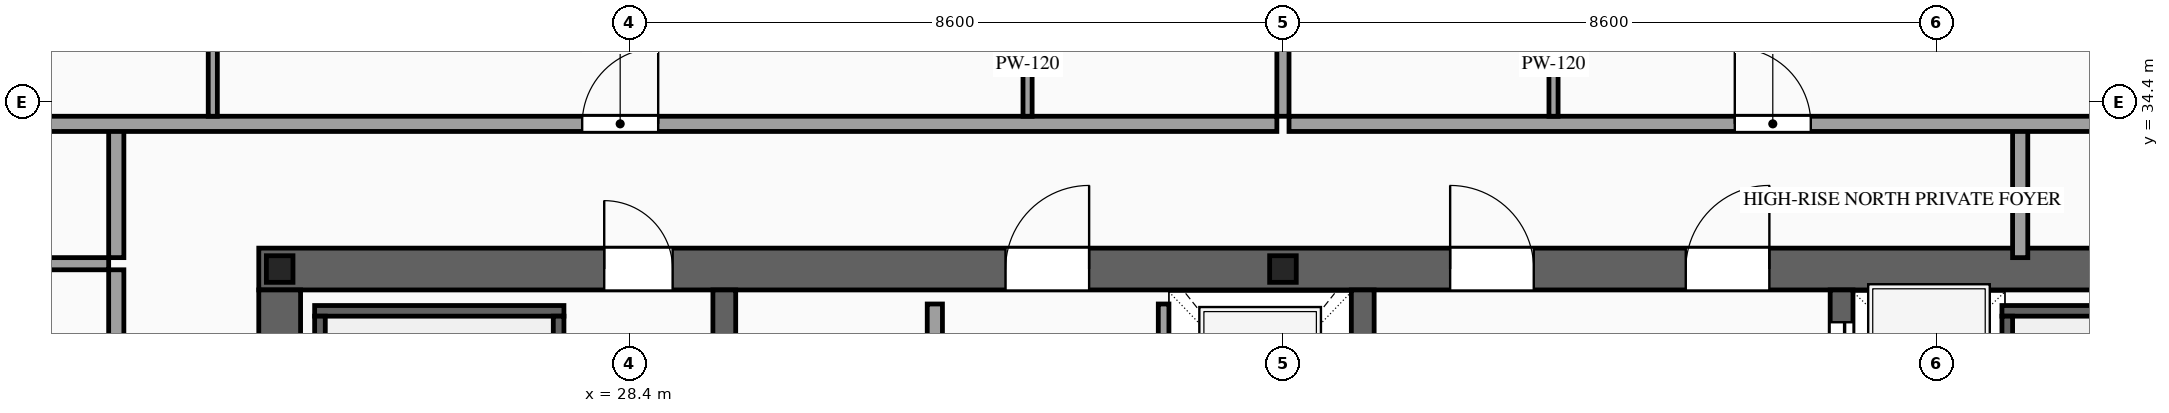
"""IFC4 building model, lengths in metres.
Left out: names, types, materials, properties, quantities, classifications, styles, units other than length and angle.
Written with IfcOpenShell. Run it as: python <this file> out.ifc"""

import sys

from ifc_helpers import new_model, si_unit, direction, frame, frame_2d, origin, origin_2d, place, context, subcontext, project, spatial, rectangle, i_section, extrude, source, transform, mapped, element, fill, save


model = new_model("IFC4")
c1 = context("Model", 3, precision=1e-05, world=origin(), true_north=direction((0.0, 1.0)))
c2 = subcontext(c1, "Body", "Model", "MODEL_VIEW")
j1 = project(units=[si_unit("LENGTHUNIT", "METRE"), si_unit("PLANEANGLEUNIT", "RADIAN")], contexts=[c1])
p1 = place(None, origin())
s1 = spatial("IfcSite", under=j1, at=p1, CompositionType="ELEMENT")
p2 = place(p1, origin())
s2 = spatial("IfcBuilding", under=s1, at=p2, CompositionType="ELEMENT")
p3 = place(p2, frame((0.0, 0.0, 275.1)))
s3 = spatial("IfcBuildingStorey", under=s2, at=p3, CompositionType="ELEMENT", Elevation=275.1)
p4 = place(p3, frame((23.525, 32.2, 0.0), z_axis=(0.0, 0.0, 1.0), x_axis=(1.0, 0.0, 0.0)))
e1 = element("IfcWall", 1, at=p4, inside=s3, PredefinedType="SHEAR", context=c2, shape_type="SweptSolid", body=[
    extrude(rectangle(XDim=26.95, YDim=0.55, at=frame_2d((13.475, 0.0))), origin(), (0.0, 0.0, 1.0), 3.5),
])
p5 = place(p4, frame((4.545, 0.0, 0.0)))
e2 = element("IfcOpeningElement", 2, at=p5, cuts=e1, PredefinedType="OPENING", context=c2, shape_type="SweptSolid", body=[
    extrude(rectangle(XDim=0.9, YDim=2.15, at=frame_2d((0.45, 1.075))), frame((0.0, 0.29, 0.0), z_axis=(0.0, -1.0, 0.0), x_axis=(1.0, 0.0, 0.0)), (0.0, 0.0, 1.0), 0.58),
])
p6 = place(p4, frame((9.825, 0.0, 0.0)))
e3 = element("IfcOpeningElement", 3, at=p6, cuts=e1, PredefinedType="OPENING", context=c2, shape_type="SweptSolid", body=[
    extrude(rectangle(XDim=1.1, YDim=2.2, at=frame_2d((0.55, 1.1))), frame((0.0, 0.29, 0.0), z_axis=(0.0, -1.0, 0.0), x_axis=(1.0, 0.0, 0.0)), (0.0, 0.0, 1.0), 0.58),
])
p7 = place(p4, frame((15.675, 0.0, 0.0)))
e4 = element("IfcOpeningElement", 4, at=p7, cuts=e1, PredefinedType="OPENING", context=c2, shape_type="SweptSolid", body=[
    extrude(rectangle(XDim=1.1, YDim=2.2, at=frame_2d((0.55, 1.1))), frame((0.0, 0.29, 0.0), z_axis=(0.0, -1.0, 0.0), x_axis=(1.0, 0.0, 0.0)), (0.0, 0.0, 1.0), 0.58),
])
p8 = place(p4, frame((18.775, 0.0, 0.0)))
e5 = element("IfcOpeningElement", 5, at=p8, cuts=e1, PredefinedType="OPENING", context=c2, shape_type="SweptSolid", body=[
    extrude(rectangle(XDim=1.1, YDim=2.2, at=frame_2d((0.55, 1.1))), frame((0.0, 0.29, 0.0), z_axis=(0.0, -1.0, 0.0), x_axis=(1.0, 0.0, 0.0)), (0.0, 0.0, 1.0), 0.58),
])
m1 = source(origin(), c2, "Body", "SweptSolid", [
    extrude(rectangle(XDim=12.25, YDim=0.55, at=frame_2d((6.125, 0.0))), origin(), (0.0, 0.0, 1.0), 3.5),
])
p9 = place(p3, frame((23.8, 19.675, 0.0), z_axis=(0.0, 0.0, 1.0), x_axis=(0.0, 1.0, 0.0)))
e6 = element("IfcWall", 6, at=p9, inside=s3, PredefinedType="SHEAR", context=c2, shape_type="MappedRepresentation", body=[
    mapped(m1, transform((0.0, 0.0, 0.0), scale=1.0)),
])
m2 = source(origin(), c2, "Body", "SweptSolid", [
    extrude(rectangle(XDim=12.25, YDim=0.3, at=frame_2d((6.125, 0.0))), origin(), (0.0, 0.0, 1.0), 3.5),
])
for number, where, z_axis, x_axis in (
    (7, (29.65, 19.675, 0.0), (0.0, 0.0, 1.0), (0.0, 1.0, 0.0)),
    (8, (38.05, 19.675, 0.0), (0.0, 0.0, 1.0), (0.0, 1.0, 0.0)),
):
    element("IfcWall", number, at=place(p3, frame(where, z_axis=z_axis, x_axis=x_axis)), inside=s3, PredefinedType="SOLIDWALL", context=c2, shape_type="MappedRepresentation", body=[
        mapped(m2, transform((0.0, 0.0, 0.0), scale=1.0)),
    ])
p10 = place(p3, frame((44.35, 19.675, 0.0), z_axis=(0.0, 0.0, 1.0), x_axis=(0.0, 1.0, 0.0)))
e9 = element("IfcWall", 9, at=p10, inside=s3, PredefinedType="SOLIDWALL", context=c2, shape_type="SweptSolid", body=[
    extrude(rectangle(XDim=12.25, YDim=0.3, at=frame_2d((6.125, 0.0))), origin(), (0.0, 0.0, 1.0), 3.5),
])
p11 = place(p10, frame((6.525, 0.0, 0.0)))
e10 = element("IfcOpeningElement", 10, at=p11, cuts=e9, PredefinedType="OPENING", context=c2, shape_type="SweptSolid", body=[
    extrude(rectangle(XDim=1.1, YDim=2.2, at=frame_2d((0.55, 1.1))), frame((0.0, 0.165, 0.0), z_axis=(0.0, -1.0, 0.0), x_axis=(1.0, 0.0, 0.0)), (0.0, 0.0, 1.0), 0.33),
])
p12 = place(p10, frame((8.625, 0.0, 0.0)))
e11 = element("IfcOpeningElement", 11, at=p12, cuts=e9, PredefinedType="OPENING", context=c2, shape_type="SweptSolid", body=[
    extrude(rectangle(XDim=1.1, YDim=2.2, at=frame_2d((0.55, 1.1))), frame((0.0, 0.165, 0.0), z_axis=(0.0, -1.0, 0.0), x_axis=(1.0, 0.0, 0.0)), (0.0, 0.0, 1.0), 0.33),
])
p13 = place(p10, frame((10.725, 0.0, 0.0)))
e12 = element("IfcOpeningElement", 12, at=p13, cuts=e9, PredefinedType="OPENING", context=c2, shape_type="SweptSolid", body=[
    extrude(rectangle(XDim=1.1, YDim=2.2, at=frame_2d((0.55, 1.1))), frame((0.0, 0.165, 0.0), z_axis=(0.0, -1.0, 0.0), x_axis=(1.0, 0.0, 0.0)), (0.0, 0.0, 1.0), 0.33),
])
m3 = source(origin(), c2, "Body", "SweptSolid", [
    extrude(i_section(OverallWidth=0.35, OverallDepth=0.35, WebThickness=0.012, FlangeThickness=0.019, at=origin_2d()), origin(), (0.0, 0.0, 1.0), 3.5),
])
for number, where, z_axis, x_axis in (
    (13, (23.8, 32.2, 0.0), (0.0, 0.0, 1.0), (1.0, 0.0, 0.0)),
    (14, (37.0, 32.2, 0.0), (0.0, 0.0, 1.0), (1.0, 0.0, 0.0)),
):
    element("IfcColumn", number, at=place(p3, frame(where, z_axis=z_axis, x_axis=x_axis)), inside=s3, PredefinedType="COLUMN", context=c2, shape_type="MappedRepresentation", body=[
        mapped(m3, transform((0.0, 0.0, 0.0), scale=1.0)),
    ])
p14 = place(p3, frame((35.43, 29.4, 0.0), z_axis=(0.0, 0.0, 1.0), x_axis=(0.0, 1.0, 0.0)))
e15 = element("IfcWall", 15, at=p14, inside=s3, PredefinedType="SOLIDWALL", context=c2, shape_type="SweptSolid", body=[
    extrude(rectangle(XDim=2.34, YDim=0.14, at=frame_2d((1.17, 0.0))), origin(), (0.0, 0.0, 1.0), 3.28),
])
p15 = place(p14, frame((0.62, 0.0, 0.0)))
e16 = element("IfcOpeningElement", 16, at=p15, cuts=e15, PredefinedType="OPENING", context=c2, shape_type="SweptSolid", body=[
    extrude(rectangle(XDim=1.1, YDim=2.2, at=frame_2d((0.55, 1.1))), frame((0.0, 0.085, 0.0), z_axis=(0.0, -1.0, 0.0), x_axis=(1.0, 0.0, 0.0)), (0.0, 0.0, 1.0), 0.17),
])
m4 = source(origin(), c2, "Body", "SweptSolid", [
    extrude(rectangle(XDim=3.28, YDim=0.14, at=frame_2d((1.64, 0.0))), origin(), (0.0, 0.0, 1.0), 3.28),
])
p16 = place(p3, frame((24.26, 31.65, 0.0), z_axis=(0.0, 0.0, 1.0), x_axis=(1.0, 0.0, 0.0)))
e17 = element("IfcWall", 17, at=p16, inside=s3, PredefinedType="SOLIDWALL", context=c2, shape_type="MappedRepresentation", body=[
    mapped(m4, transform((0.0, 0.0, 0.0), scale=1.0)),
])
m5 = source(origin(), c2, "Body", "SweptSolid", [
    extrude(rectangle(XDim=8.94, YDim=0.14, at=frame_2d((4.47, 0.0))), origin(), (0.0, 0.0, 1.0), 3.28),
])
for number, where, z_axis, x_axis in (
    (18, (24.33, 22.64, 0.0), (0.0, 0.0, 1.0), (0.0, 1.0, 0.0)),
    (19, (27.47, 22.64, 0.0), (0.0, 0.0, 1.0), (0.0, 1.0, 0.0)),
):
    element("IfcWall", number, at=place(p3, frame(where, z_axis=z_axis, x_axis=x_axis)), inside=s3, PredefinedType="SOLIDWALL", context=c2, shape_type="MappedRepresentation", body=[
        mapped(m5, transform((0.0, 0.0, 0.0), scale=1.0)),
    ])
p17 = place(p3, frame((46.46, 31.65, 0.0), z_axis=(0.0, 0.0, 1.0), x_axis=(1.0, 0.0, 0.0)))
e20 = element("IfcWall", 20, at=p17, inside=s3, PredefinedType="SOLIDWALL", context=c2, shape_type="MappedRepresentation", body=[
    mapped(m4, transform((0.0, 0.0, 0.0), scale=1.0)),
])
p18 = place(p3, frame((46.53, 22.64, 0.0), z_axis=(0.0, 0.0, 1.0), x_axis=(0.0, 1.0, 0.0)))
e21 = element("IfcWall", 21, at=p18, inside=s3, PredefinedType="SOLIDWALL", context=c2, shape_type="MappedRepresentation", body=[
    mapped(m5, transform((0.0, 0.0, 0.0), scale=1.0)),
])
p19 = place(p3, frame((32.42, 28.05, 0.0), z_axis=(0.0, 0.0, 1.0), x_axis=(0.0, 1.0, 0.0)))
e22 = element("IfcWall", 22, at=p19, inside=s3, PredefinedType="PARTITIONING", context=c2, shape_type="SweptSolid", body=[
    extrude(rectangle(XDim=3.69, YDim=0.2, at=frame_2d((1.845, 0.0))), origin(), (0.0, 0.0, 1.0), 3.28),
])
p20 = place(p19, frame((1.395, 0.0, 0.0)))
e23 = element("IfcOpeningElement", 23, at=p20, cuts=e22, PredefinedType="OPENING", context=c2, shape_type="SweptSolid", body=[
    extrude(rectangle(XDim=0.9, YDim=2.15, at=frame_2d((0.45, 1.075))), frame((0.0, 0.115, 0.0), z_axis=(0.0, -1.0, 0.0), x_axis=(1.0, 0.0, 0.0)), (0.0, 0.0, 1.0), 0.23),
])
m6 = source(origin(), c2, "Body", "SweptSolid", [
    extrude(rectangle(XDim=1.7, YDim=0.2, at=frame_2d((0.85, 0.0))), origin(), (0.0, 0.0, 1.0), 3.28),
])
for number, where, z_axis, x_axis in (
    (24, (21.65, 32.35, 0.0), (0.0, 0.0, 1.0), (0.0, 1.0, 0.0)),
    (25, (46.7, 32.35, 0.0), (0.0, 0.0, 1.0), (0.0, 1.0, 0.0)),
):
    element("IfcWall", number, at=place(p3, frame(where, z_axis=z_axis, x_axis=x_axis)), inside=s3, PredefinedType="PARTITIONING", context=c2, shape_type="MappedRepresentation", body=[
        mapped(m6, transform((0.0, 0.0, 0.0), scale=1.0)),
    ])
p21 = place(p3, frame((19.44, 34.11, 0.0), z_axis=(0.0, 0.0, 1.0), x_axis=(1.0, 0.0, 0.0)))
e26 = element("IfcWall", 26, at=p21, inside=s3, PredefinedType="PARTITIONING", context=c2, shape_type="SweptSolid", body=[
    extrude(rectangle(XDim=17.48, YDim=0.2, at=frame_2d((8.74, 0.0))), origin(), (0.0, 0.0, 1.0), 3.28),
])
p22 = place(p21, frame((8.34, 0.0, 0.0)))
e27 = element("IfcOpeningElement", 27, at=p22, cuts=e26, PredefinedType="OPENING", context=c2, shape_type="SweptSolid", body=[
    extrude(rectangle(XDim=1.0, YDim=2.2, at=frame_2d((0.5, 1.1))), frame((0.0, 0.115, 0.0), z_axis=(0.0, -1.0, 0.0), x_axis=(1.0, 0.0, 0.0)), (0.0, 0.0, 1.0), 0.23),
])
m7 = source(origin(), c2, "Body", "SweptSolid", [
    extrude(rectangle(XDim=12.04, YDim=0.16, at=frame_2d((6.02, 0.0))), origin(), (0.0, 0.0, 1.0), 2.787),
])
p23 = place(p3, frame((37.0, 34.21, 0.0), z_axis=(0.0, 0.0, 1.0), x_axis=(0.0, 1.0, 0.0)))
e28 = element("IfcWall", 28, at=p23, inside=s3, PredefinedType="PARTITIONING", context=c2, shape_type="MappedRepresentation", body=[
    mapped(m7, transform((0.0, 0.0, 0.0), scale=1.0)),
])
p24 = place(p3, frame((22.92, 34.21, 0.0), z_axis=(0.0, 0.0, 1.0), x_axis=(0.0, 1.0, 0.0)))
e29 = element("IfcWall", 29, at=p24, inside=s3, PredefinedType="PARTITIONING", context=c2, shape_type="SweptSolid", body=[
    extrude(rectangle(XDim=4.11, YDim=0.12, at=frame_2d((2.055, 0.0))), origin(), (0.0, 0.0, 1.0), 3.28),
])
p25 = place(p24, frame((1.63, 0.0, 0.0)))
e30 = element("IfcOpeningElement", 30, at=p25, cuts=e29, PredefinedType="OPENING", context=c2, shape_type="SweptSolid", body=[
    extrude(rectangle(XDim=0.85, YDim=2.1, at=frame_2d((0.425, 1.05))), frame((0.0, 0.075, 0.0), z_axis=(0.0, -1.0, 0.0), x_axis=(1.0, 0.0, 0.0)), (0.0, 0.0, 1.0), 0.15),
])
p26 = place(p3, frame((33.64, 34.21, 0.0), z_axis=(0.0, 0.0, 1.0), x_axis=(0.0, 1.0, 0.0)))
e31 = element("IfcWall", 31, at=p26, inside=s3, PredefinedType="PARTITIONING", context=c2, shape_type="SweptSolid", body=[
    extrude(rectangle(XDim=4.11, YDim=0.12, at=frame_2d((2.055, 0.0))), origin(), (0.0, 0.0, 1.0), 3.28),
])
p27 = place(p26, frame((1.63, 0.0, 0.0)))
e32 = element("IfcOpeningElement", 32, at=p27, cuts=e31, PredefinedType="OPENING", context=c2, shape_type="SweptSolid", body=[
    extrude(rectangle(XDim=0.85, YDim=2.1, at=frame_2d((0.425, 1.05))), frame((0.0, 0.075, 0.0), z_axis=(0.0, -1.0, 0.0), x_axis=(1.0, 0.0, 0.0)), (0.0, 0.0, 1.0), 0.15),
])
p28 = place(p3, frame((37.08, 34.11, 0.0), z_axis=(0.0, 0.0, 1.0), x_axis=(1.0, 0.0, 0.0)))
e33 = element("IfcWall", 33, at=p28, inside=s3, PredefinedType="PARTITIONING", context=c2, shape_type="SweptSolid", body=[
    extrude(rectangle(XDim=17.48, YDim=0.2, at=frame_2d((8.74, 0.0))), origin(), (0.0, 0.0, 1.0), 3.28),
])
p29 = place(p28, frame((5.865, 0.0, 0.0)))
e34 = element("IfcOpeningElement", 34, at=p29, cuts=e33, PredefinedType="OPENING", context=c2, shape_type="SweptSolid", body=[
    extrude(rectangle(XDim=1.0, YDim=2.2, at=frame_2d((0.5, 1.1))), frame((0.0, 0.115, 0.0), z_axis=(0.0, -1.0, 0.0), x_axis=(1.0, 0.0, 0.0)), (0.0, 0.0, 1.0), 0.23),
])
p30 = place(p3, frame((40.56, 34.21, 0.0), z_axis=(0.0, 0.0, 1.0), x_axis=(0.0, 1.0, 0.0)))
e35 = element("IfcWall", 35, at=p30, inside=s3, PredefinedType="PARTITIONING", context=c2, shape_type="SweptSolid", body=[
    extrude(rectangle(XDim=4.11, YDim=0.12, at=frame_2d((2.055, 0.0))), origin(), (0.0, 0.0, 1.0), 3.28),
])
p31 = place(p30, frame((1.63, 0.0, 0.0)))
e36 = element("IfcOpeningElement", 36, at=p31, cuts=e35, PredefinedType="OPENING", context=c2, shape_type="SweptSolid", body=[
    extrude(rectangle(XDim=0.85, YDim=2.1, at=frame_2d((0.425, 1.05))), frame((0.0, 0.075, 0.0), z_axis=(0.0, -1.0, 0.0), x_axis=(1.0, 0.0, 0.0)), (0.0, 0.0, 1.0), 0.15),
])
p32 = place(p3, frame((21.65, 19.41, 0.0), z_axis=(0.0, 0.0, 1.0), x_axis=(0.0, 1.0, 0.0)))
e37 = element("IfcWall", 37, at=p32, inside=s3, PredefinedType="PARTITIONING", context=c2, shape_type="SweptSolid", body=[
    extrude(rectangle(XDim=12.78, YDim=0.2, at=frame_2d((6.39, 0.0))), origin(), (0.0, 0.0, 1.0), 3.28),
])
p33 = place(p32, frame((5.89, 0.0, 0.0)))
e38 = element("IfcOpeningElement", 38, at=p33, cuts=e37, PredefinedType="OPENING", context=c2, shape_type="SweptSolid", body=[
    extrude(rectangle(XDim=1.0, YDim=2.2, at=frame_2d((0.5, 1.1))), frame((0.0, 0.115, 0.0), z_axis=(0.0, -1.0, 0.0), x_axis=(1.0, 0.0, 0.0)), (0.0, 0.0, 1.0), 0.23),
])
m8 = source(origin(), c2, "Body", "SweptSolid", [
    extrude(rectangle(XDim=5.0, YDim=0.16, at=frame_2d((2.5, 0.0))), origin(), (0.0, 0.0, 1.0), 2.825),
])
p34 = place(p3, frame((16.55, 32.27, 0.0), z_axis=(0.0, 0.0, 1.0), x_axis=(1.0, 0.0, 0.0)))
e39 = element("IfcWall", 39, at=p34, inside=s3, PredefinedType="PARTITIONING", context=c2, shape_type="MappedRepresentation", body=[
    mapped(m8, transform((0.0, 0.0, 0.0), scale=1.0)),
])
m9 = source(origin(), c2, "Body", "SweptSolid", [
    extrude(rectangle(XDim=1.1, YDim=2.2, at=frame_2d((0.55, 1.1))), frame((0.0, 0.025, 0.0), z_axis=(0.0, -1.0, 0.0), x_axis=(1.0, 0.0, 0.0)), (0.0, 0.0, 1.0), 0.05),
])
p35 = place(p13, origin())
e40 = element("IfcDoor", 40, at=p35, inside=s3, OperationType="SLIDING_TO_LEFT", PredefinedType="DOOR", context=c2, shape_type="MappedRepresentation", body=[
    mapped(m9, transform((0.0, 0.0, 0.0), scale=1.0)),
])
fill(e12, e40)
m10 = source(origin(), c2, "Body", "SweptSolid", [
    extrude(rectangle(XDim=0.9, YDim=2.15, at=frame_2d((0.45, 1.075))), frame((0.0, 0.025, 0.0), z_axis=(0.0, -1.0, 0.0), x_axis=(1.0, 0.0, 0.0)), (0.0, 0.0, 1.0), 0.05),
])
p36 = place(p5, origin())
e41 = element("IfcDoor", 41, at=p36, inside=s3, OperationType="SINGLE_SWING_LEFT", PredefinedType="DOOR", context=c2, shape_type="MappedRepresentation", body=[
    mapped(m10, transform((0.0, 0.0, 0.0), scale=1.0)),
])
fill(e2, e41)
m11 = source(origin(), c2, "Body", "SweptSolid", [
    extrude(rectangle(XDim=1.1, YDim=2.2, at=frame_2d((0.55, 1.1))), frame((0.0, 0.025, 0.0), z_axis=(0.0, -1.0, 0.0), x_axis=(1.0, 0.0, 0.0)), (0.0, 0.0, 1.0), 0.05),
])
p37 = place(p6, origin())
e42 = element("IfcDoor", 42, at=p37, inside=s3, OperationType="SINGLE_SWING_RIGHT", PredefinedType="DOOR", context=c2, shape_type="MappedRepresentation", body=[
    mapped(m11, transform((0.0, 0.0, 0.0), scale=1.0)),
])
fill(e3, e42)
p38 = place(p7, origin())
e43 = element("IfcDoor", 43, at=p38, inside=s3, OperationType="SINGLE_SWING_LEFT", PredefinedType="DOOR", context=c2, shape_type="MappedRepresentation", body=[
    mapped(m11, transform((0.0, 0.0, 0.0), scale=1.0)),
])
fill(e4, e43)
p39 = place(p8, origin())
e44 = element("IfcDoor", 44, at=p39, inside=s3, OperationType="SINGLE_SWING_RIGHT", PredefinedType="DOOR", context=c2, shape_type="MappedRepresentation", body=[
    mapped(m11, transform((0.0, 0.0, 0.0), scale=1.0)),
])
fill(e5, e44)
m12 = source(origin(), c2, "Body", "SweptSolid", [
    extrude(rectangle(XDim=1.0, YDim=2.2, at=frame_2d((0.5, 1.1))), frame((0.0, 0.025, 0.0), z_axis=(0.0, -1.0, 0.0), x_axis=(1.0, 0.0, 0.0)), (0.0, 0.0, 1.0), 0.05),
])
p40 = place(p22, origin())
e45 = element("IfcDoor", 45, at=p40, inside=s3, OperationType="SINGLE_SWING_RIGHT", PredefinedType="DOOR", context=c2, shape_type="MappedRepresentation", body=[
    mapped(m12, transform((0.0, 0.0, 0.0), scale=1.0)),
])
fill(e27, e45)
p41 = place(p29, origin())
e46 = element("IfcDoor", 46, at=p41, inside=s3, OperationType="SINGLE_SWING_LEFT", PredefinedType="DOOR", context=c2, shape_type="MappedRepresentation", body=[
    mapped(m12, transform((0.0, 0.0, 0.0), scale=1.0)),
])
fill(e34, e46)
save(model, sys.argv[1])
